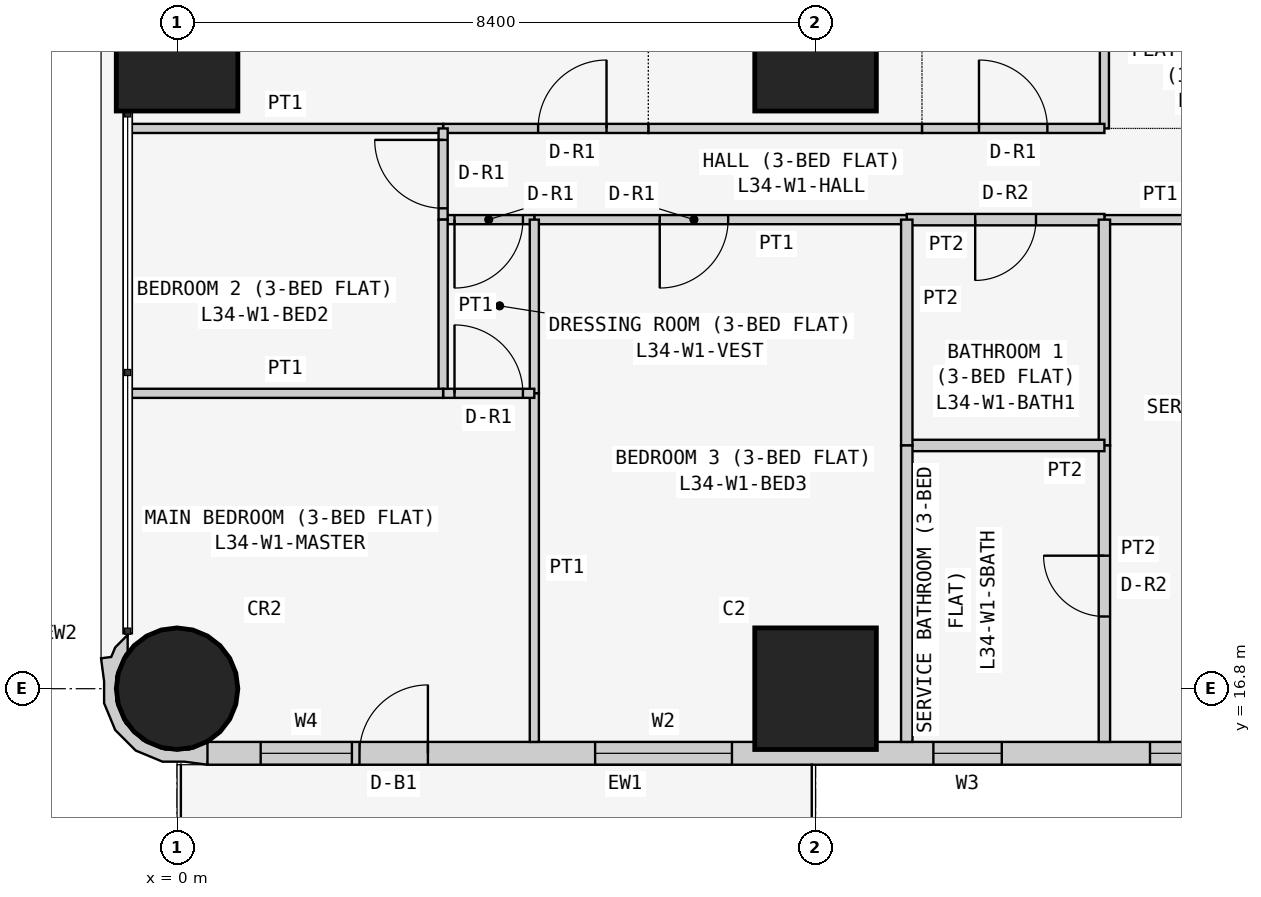
"""IFC4 building model, lengths in metres.
Left out: names, types, materials, properties, quantities, classifications, styles, units other than length and angle.
Written with IfcOpenShell. Run it as: python <this file> out.ifc"""

import sys

from ifc_helpers import new_model, si_unit, direction, frame, frame_2d, origin, origin_2d, place, context, subcontext, project, spatial, polyline, rectangle, circle, outline, extrude, element, fill, save


model = new_model("IFC4")
c1 = context("Model", 3, precision=1e-05, world=origin(), true_north=direction((0.0, 1.0)))
c2 = subcontext(c1, "Body", "Model", "MODEL_VIEW")
j1 = project(units=[si_unit("LENGTHUNIT", "METRE"), si_unit("PLANEANGLEUNIT", "RADIAN")], contexts=[c1])
p1 = place(None, origin())
s1 = spatial("IfcSite", under=j1, at=p1, CompositionType="ELEMENT")
p2 = place(p1, origin())
s2 = spatial("IfcBuilding", under=s1, at=p2, CompositionType="ELEMENT")
p3 = place(p2, frame((0.0, 0.0, 134.1)))
s3 = spatial("IfcBuildingStorey", under=s2, at=p3, CompositionType="ELEMENT", Elevation=134.1)
p4 = place(p3, frame((0.0, 16.8, 0.0), z_axis=(0.0, 0.0, 1.0), x_axis=(1.0, 0.0, 0.0)))
e1 = element("IfcColumn", 1, at=p4, inside=s3, PredefinedType="COLUMN", context=c2, shape_type="SweptSolid", body=[
    extrude(circle(Radius=0.8, at=origin_2d()), origin(), (0.0, 0.0, 1.0), 3.6),
])
for number, where, z_axis, x_axis in (
    (2, (0.0, 25.2, 0.0), (0.0, 0.0, 1.0), (1.0, 0.0, 0.0)),
    (3, (8.4, 16.8, 0.0), (0.0, 0.0, 1.0), (1.0, 0.0, 0.0)),
    (4, (8.4, 25.2, 0.0), (0.0, 0.0, 1.0), (1.0, 0.0, 0.0)),
):
    element("IfcColumn", number, at=place(p3, frame(where, z_axis=z_axis, x_axis=x_axis)), inside=s3, PredefinedType="COLUMN", context=c2, shape_type="SweptSolid", body=[
        extrude(rectangle(XDim=1.6, YDim=1.6, at=origin_2d()), origin(), (0.0, 0.0, 1.0), 3.6),
    ])
p5 = place(p3, frame((0.4, 15.95, 0.0), z_axis=(0.0, 0.0, 1.0), x_axis=(1.0, 0.0, 0.0)))
e5 = element("IfcWall", 5, at=p5, inside=s3, PredefinedType="SOLIDWALL", context=c2, shape_type="SweptSolid", body=[
    extrude(rectangle(XDim=15.7, YDim=0.3, at=frame_2d((7.85, 0.0))), origin(), (0.0, 0.0, 1.0), 3.45),
])
p6 = place(p5, frame((12.4, 0.0, 0.9)))
e6 = element("IfcOpeningElement", 6, at=p6, cuts=e5, PredefinedType="OPENING", context=c2, shape_type="SweptSolid", body=[
    extrude(rectangle(XDim=1.8, YDim=1.5, at=frame_2d((0.9, 0.75))), frame((0.0, 0.16, 0.0), z_axis=(0.0, -1.0, 0.0), x_axis=(1.0, 0.0, 0.0)), (0.0, 0.0, 1.0), 0.32),
])
p7 = place(p5, frame((9.55, 0.0, 1.5)))
e7 = element("IfcOpeningElement", 7, at=p7, cuts=e5, PredefinedType="OPENING", context=c2, shape_type="SweptSolid", body=[
    extrude(rectangle(XDim=0.9, YDim=0.7, at=frame_2d((0.45, 0.35))), frame((0.0, 0.16, 0.0), z_axis=(0.0, -1.0, 0.0), x_axis=(1.0, 0.0, 0.0)), (0.0, 0.0, 1.0), 0.32),
])
p8 = place(p5, frame((5.1, 0.0, 0.9)))
e8 = element("IfcOpeningElement", 8, at=p8, cuts=e5, PredefinedType="OPENING", context=c2, shape_type="SweptSolid", body=[
    extrude(rectangle(XDim=1.8, YDim=1.5, at=frame_2d((0.9, 0.75))), frame((0.0, 0.16, 0.0), z_axis=(0.0, -1.0, 0.0), x_axis=(1.0, 0.0, 0.0)), (0.0, 0.0, 1.0), 0.32),
])
p9 = place(p5, frame((2.0, 0.0, 0.0)))
e9 = element("IfcOpeningElement", 9, at=p9, cuts=e5, PredefinedType="OPENING", context=c2, shape_type="SweptSolid", body=[
    extrude(rectangle(XDim=0.9, YDim=2.4, at=frame_2d((0.45, 1.2))), frame((0.0, 0.16, 0.0), z_axis=(0.0, -1.0, 0.0), x_axis=(1.0, 0.0, 0.0)), (0.0, 0.0, 1.0), 0.32),
])
p10 = place(p5, frame((0.7, 0.0, 0.9)))
e10 = element("IfcOpeningElement", 10, at=p10, cuts=e5, PredefinedType="OPENING", context=c2, shape_type="SweptSolid", body=[
    extrude(rectangle(XDim=1.2, YDim=1.5, at=frame_2d((0.6, 0.75))), frame((0.0, 0.16, 0.0), z_axis=(0.0, -1.0, 0.0), x_axis=(1.0, 0.0, 0.0)), (0.0, 0.0, 1.0), 0.32),
])
p11 = place(p3, frame((-0.595, 17.448, 0.0), z_axis=(0.0, 0.0, 1.0), x_axis=(-0.93923434088, -0.343276641956, 0.0)))
e11 = element("IfcWall", 11, at=p11, inside=s3, PredefinedType="SOLIDWALL", context=c2, shape_type="SweptSolid", body=[
    extrude(outline(polyline([(-0.369, 1.89), (-0.509, 1.621), (-0.491, 1.614), (-0.479, 1.609), (-0.211, 1.62), (0.088, 1.511), (0.323, 1.295), (0.457, 1.006), (0.47, 0.688), (0.361, 0.389), (0.146, 0.154), (0.108, 0.137), (0.031, -0.075), (0.241, 0.023), (0.334, 0.124), (0.465, 0.094), (0.532, 0.393), (0.631, 0.663), (0.614, 1.045), (0.453, 1.391), (0.172, 1.649), (-0.098, 1.748), (-0.369, 1.89)])), origin(), (0.0, 0.0, 1.0), 3.45),
])
p12 = place(p3, frame((12.2, 29.4, 0.0), z_axis=(0.0, 0.0, 1.0), x_axis=(0.0, -1.0, 0.0)))
e12 = element("IfcWall", 12, at=p12, inside=s3, PredefinedType="PARTITIONING", context=c2, shape_type="SweptSolid", body=[
    extrude(rectangle(XDim=5.229, YDim=0.12, at=frame_2d((2.615, 0.0))), origin(), (0.0, 0.0, 1.0), 3.45),
])
p13 = place(p3, frame((9.8, 24.171, 0.0), z_axis=(0.0, 0.0, 1.0), x_axis=(1.0, 0.0, 0.0)))
e13 = element("IfcWall", 13, at=p13, inside=s3, PredefinedType="PARTITIONING", context=c2, shape_type="SweptSolid", body=[
    extrude(rectangle(XDim=2.4, YDim=0.12, at=frame_2d((1.2, 0.0))), origin(), (0.0, 0.0, 1.0), 3.45),
])
p14 = place(p13, frame((0.75, 0.0, 0.0)))
e14 = element("IfcOpeningElement", 14, at=p14, cuts=e13, PredefinedType="OPENING", context=c2, shape_type="SweptSolid", body=[
    extrude(rectangle(XDim=0.9, YDim=2.1, at=frame_2d((0.45, 1.05))), frame((0.0, 0.07, 0.0), z_axis=(0.0, -1.0, 0.0), x_axis=(1.0, 0.0, 0.0)), (0.0, 0.0, 1.0), 0.14),
])
p15 = place(p3, frame((6.2, 24.171, 0.0), z_axis=(0.0, 0.0, 1.0), x_axis=(1.0, 0.0, 0.0)))
e15 = element("IfcWall", 15, at=p15, inside=s3, PredefinedType="PARTITIONING", context=c2, shape_type="SweptSolid", body=[
    extrude(rectangle(XDim=3.6, YDim=0.12, at=frame_2d((1.8, 0.0))), origin(), (0.0, 0.0, 1.0), 3.45),
])
p16 = place(p3, frame((3.5, 24.171, 0.0), z_axis=(0.0, 0.0, 1.0), x_axis=(1.0, 0.0, 0.0)))
e16 = element("IfcWall", 16, at=p16, inside=s3, PredefinedType="PARTITIONING", context=c2, shape_type="SweptSolid", body=[
    extrude(rectangle(XDim=2.7, YDim=0.12, at=frame_2d((1.35, 0.0))), origin(), (0.0, 0.0, 1.0), 3.45),
])
p17 = place(p16, frame((1.25, 0.0, 0.0)))
e17 = element("IfcOpeningElement", 17, at=p17, cuts=e16, PredefinedType="OPENING", context=c2, shape_type="SweptSolid", body=[
    extrude(rectangle(XDim=0.9, YDim=2.1, at=frame_2d((0.45, 1.05))), frame((0.0, 0.07, 0.0), z_axis=(0.0, -1.0, 0.0), x_axis=(1.0, 0.0, 0.0)), (0.0, 0.0, 1.0), 0.14),
])
p18 = place(p3, frame((-0.65, 24.171, 0.0), z_axis=(0.0, 0.0, 1.0), x_axis=(1.0, 0.0, 0.0)))
e18 = element("IfcWall", 18, at=p18, inside=s3, PredefinedType="PARTITIONING", context=c2, shape_type="SweptSolid", body=[
    extrude(rectangle(XDim=4.15, YDim=0.12, at=frame_2d((2.075, 0.0))), origin(), (0.0, 0.0, 1.0), 3.45),
])
p19 = place(p3, frame((12.2, 22.971, 0.0), z_axis=(0.0, 0.0, 1.0), x_axis=(1.0, 0.0, 0.0)))
e19 = element("IfcWall", 19, at=p19, inside=s3, PredefinedType="PARTITIONING", context=c2, shape_type="SweptSolid", body=[
    extrude(rectangle(XDim=3.675, YDim=0.12, at=frame_2d((1.837, 0.0))), origin(), (0.0, 0.0, 1.0), 3.45),
])
p20 = place(p19, frame((1.35, 0.0, 0.0)))
e20 = element("IfcOpeningElement", 20, at=p20, cuts=e19, PredefinedType="OPENING", context=c2, shape_type="SweptSolid", body=[
    extrude(rectangle(XDim=0.9, YDim=2.1, at=frame_2d((0.45, 1.05))), frame((0.0, 0.07, 0.0), z_axis=(0.0, -1.0, 0.0), x_axis=(1.0, 0.0, 0.0)), (0.0, 0.0, 1.0), 0.14),
])
p21 = place(p3, frame((9.6, 22.971, 0.0), z_axis=(0.0, 0.0, 1.0), x_axis=(1.0, 0.0, 0.0)))
e21 = element("IfcWall", 21, at=p21, inside=s3, PredefinedType="PARTITIONING", context=c2, shape_type="SweptSolid", body=[
    extrude(rectangle(XDim=2.6, YDim=0.15, at=frame_2d((1.3, 0.0))), origin(), (0.0, 0.0, 1.0), 3.45),
])
p22 = place(p21, frame((0.9, 0.0, 0.0)))
e22 = element("IfcOpeningElement", 22, at=p22, cuts=e21, PredefinedType="OPENING", context=c2, shape_type="SweptSolid", body=[
    extrude(rectangle(XDim=0.8, YDim=2.1, at=frame_2d((0.4, 1.05))), frame((0.0, 0.085, 0.0), z_axis=(0.0, -1.0, 0.0), x_axis=(1.0, 0.0, 0.0)), (0.0, 0.0, 1.0), 0.17),
])
p23 = place(p3, frame((4.7, 22.971, 0.0), z_axis=(0.0, 0.0, 1.0), x_axis=(1.0, 0.0, 0.0)))
e23 = element("IfcWall", 23, at=p23, inside=s3, PredefinedType="PARTITIONING", context=c2, shape_type="SweptSolid", body=[
    extrude(rectangle(XDim=4.9, YDim=0.12, at=frame_2d((2.45, 0.0))), origin(), (0.0, 0.0, 1.0), 3.45),
])
p24 = place(p23, frame((1.65, 0.0, 0.0)))
e24 = element("IfcOpeningElement", 24, at=p24, cuts=e23, PredefinedType="OPENING", context=c2, shape_type="SweptSolid", body=[
    extrude(rectangle(XDim=0.9, YDim=2.1, at=frame_2d((0.45, 1.05))), frame((0.0, 0.07, 0.0), z_axis=(0.0, -1.0, 0.0), x_axis=(1.0, 0.0, 0.0)), (0.0, 0.0, 1.0), 0.14),
])
p25 = place(p3, frame((3.5, 22.971, 0.0), z_axis=(0.0, 0.0, 1.0), x_axis=(1.0, 0.0, 0.0)))
e25 = element("IfcWall", 25, at=p25, inside=s3, PredefinedType="PARTITIONING", context=c2, shape_type="SweptSolid", body=[
    extrude(rectangle(XDim=1.2, YDim=0.12, at=frame_2d((0.6, 0.0))), origin(), (0.0, 0.0, 1.0), 3.45),
])
p26 = place(p25, frame((0.15, 0.0, 0.0)))
e26 = element("IfcOpeningElement", 26, at=p26, cuts=e25, PredefinedType="OPENING", context=c2, shape_type="SweptSolid", body=[
    extrude(rectangle(XDim=0.9, YDim=2.1, at=frame_2d((0.45, 1.05))), frame((0.0, 0.07, 0.0), z_axis=(0.0, -1.0, 0.0), x_axis=(1.0, 0.0, 0.0)), (0.0, 0.0, 1.0), 0.14),
])
p27 = place(p3, frame((3.5, 24.171, 0.0), z_axis=(0.0, 0.0, 1.0), x_axis=(0.0, -1.0, 0.0)))
e27 = element("IfcWall", 27, at=p27, inside=s3, PredefinedType="PARTITIONING", context=c2, shape_type="SweptSolid", body=[
    extrude(rectangle(XDim=1.2, YDim=0.12, at=frame_2d((0.6, 0.0))), origin(), (0.0, 0.0, 1.0), 3.45),
])
p28 = place(p27, frame((0.151, 0.0, 0.0)))
e28 = element("IfcOpeningElement", 28, at=p28, cuts=e27, PredefinedType="OPENING", context=c2, shape_type="SweptSolid", body=[
    extrude(rectangle(XDim=0.9, YDim=2.1, at=frame_2d((0.45, 1.05))), frame((0.0, 0.07, 0.0), z_axis=(0.0, -1.0, 0.0), x_axis=(1.0, 0.0, 0.0)), (0.0, 0.0, 1.0), 0.14),
])
p29 = place(p3, frame((12.2, 22.971, 0.0), z_axis=(0.0, 0.0, 1.0), x_axis=(0.0, -1.0, 0.0)))
e29 = element("IfcWall", 29, at=p29, inside=s3, PredefinedType="PARTITIONING", context=c2, shape_type="SweptSolid", body=[
    extrude(rectangle(XDim=2.971, YDim=0.15, at=frame_2d((1.485, 0.0))), origin(), (0.0, 0.0, 1.0), 3.45),
])
p30 = place(p3, frame((12.2, 20.0, 0.0), z_axis=(0.0, 0.0, 1.0), x_axis=(0.0, -1.0, 0.0)))
e30 = element("IfcWall", 30, at=p30, inside=s3, PredefinedType="PARTITIONING", context=c2, shape_type="SweptSolid", body=[
    extrude(rectangle(XDim=3.9, YDim=0.15, at=frame_2d((1.95, 0.0))), origin(), (0.0, 0.0, 1.0), 3.45),
])
p31 = place(p30, frame((1.45, 0.0, 0.0)))
e31 = element("IfcOpeningElement", 31, at=p31, cuts=e30, PredefinedType="OPENING", context=c2, shape_type="SweptSolid", body=[
    extrude(rectangle(XDim=0.8, YDim=2.1, at=frame_2d((0.4, 1.05))), frame((0.0, 0.085, 0.0), z_axis=(0.0, -1.0, 0.0), x_axis=(1.0, 0.0, 0.0)), (0.0, 0.0, 1.0), 0.17),
])
p32 = place(p3, frame((9.6, 20.0, 0.0), z_axis=(0.0, 0.0, 1.0), x_axis=(1.0, 0.0, 0.0)))
e32 = element("IfcWall", 32, at=p32, inside=s3, PredefinedType="PARTITIONING", context=c2, shape_type="SweptSolid", body=[
    extrude(rectangle(XDim=2.6, YDim=0.15, at=frame_2d((1.3, 0.0))), origin(), (0.0, 0.0, 1.0), 3.45),
])
p33 = place(p3, frame((9.6, 22.971, 0.0), z_axis=(0.0, 0.0, 1.0), x_axis=(0.0, -1.0, 0.0)))
e33 = element("IfcWall", 33, at=p33, inside=s3, PredefinedType="PARTITIONING", context=c2, shape_type="SweptSolid", body=[
    extrude(rectangle(XDim=2.971, YDim=0.15, at=frame_2d((1.485, 0.0))), origin(), (0.0, 0.0, 1.0), 3.45),
])
p34 = place(p3, frame((9.6, 20.0, 0.0), z_axis=(0.0, 0.0, 1.0), x_axis=(0.0, -1.0, 0.0)))
e34 = element("IfcWall", 34, at=p34, inside=s3, PredefinedType="PARTITIONING", context=c2, shape_type="SweptSolid", body=[
    extrude(rectangle(XDim=3.9, YDim=0.15, at=frame_2d((1.95, 0.0))), origin(), (0.0, 0.0, 1.0), 3.45),
])
p35 = place(p3, frame((4.7, 22.971, 0.0), z_axis=(0.0, 0.0, 1.0), x_axis=(0.0, -1.0, 0.0)))
e35 = element("IfcWall", 35, at=p35, inside=s3, PredefinedType="PARTITIONING", context=c2, shape_type="SweptSolid", body=[
    extrude(rectangle(XDim=2.285, YDim=0.12, at=frame_2d((1.143, 0.0))), origin(), (0.0, 0.0, 1.0), 3.45),
])
p36 = place(p3, frame((4.7, 20.686, 0.0), z_axis=(0.0, 0.0, 1.0), x_axis=(0.0, -1.0, 0.0)))
e36 = element("IfcWall", 36, at=p36, inside=s3, PredefinedType="PARTITIONING", context=c2, shape_type="SweptSolid", body=[
    extrude(rectangle(XDim=4.586, YDim=0.12, at=frame_2d((2.293, 0.0))), origin(), (0.0, 0.0, 1.0), 3.45),
])
p37 = place(p3, frame((3.5, 22.971, 0.0), z_axis=(0.0, 0.0, 1.0), x_axis=(0.0, -1.0, 0.0)))
e37 = element("IfcWall", 37, at=p37, inside=s3, PredefinedType="PARTITIONING", context=c2, shape_type="SweptSolid", body=[
    extrude(rectangle(XDim=2.285, YDim=0.12, at=frame_2d((1.143, 0.0))), origin(), (0.0, 0.0, 1.0), 3.45),
])
p38 = place(p3, frame((3.5, 20.686, 0.0), z_axis=(0.0, 0.0, 1.0), x_axis=(1.0, 0.0, 0.0)))
e38 = element("IfcWall", 38, at=p38, inside=s3, PredefinedType="PARTITIONING", context=c2, shape_type="SweptSolid", body=[
    extrude(rectangle(XDim=1.2, YDim=0.12, at=frame_2d((0.6, 0.0))), origin(), (0.0, 0.0, 1.0), 3.45),
])
p39 = place(p38, frame((0.15, 0.0, 0.0)))
e39 = element("IfcOpeningElement", 39, at=p39, cuts=e38, PredefinedType="OPENING", context=c2, shape_type="SweptSolid", body=[
    extrude(rectangle(XDim=0.9, YDim=2.1, at=frame_2d((0.45, 1.05))), frame((0.0, 0.07, 0.0), z_axis=(0.0, -1.0, 0.0), x_axis=(1.0, 0.0, 0.0)), (0.0, 0.0, 1.0), 0.14),
])
p40 = place(p3, frame((-0.65, 20.686, 0.0), z_axis=(0.0, 0.0, 1.0), x_axis=(1.0, 0.0, 0.0)))
e40 = element("IfcWall", 40, at=p40, inside=s3, PredefinedType="PARTITIONING", context=c2, shape_type="SweptSolid", body=[
    extrude(rectangle(XDim=4.15, YDim=0.12, at=frame_2d((2.075, 0.0))), origin(), (0.0, 0.0, 1.0), 3.45),
])
p41 = place(p6, origin())
e41 = element("IfcWindow", 41, at=p41, inside=s3, PartitioningType="SINGLE_PANEL", PredefinedType="WINDOW", context=c2, shape_type="SweptSolid", body=[
    extrude(rectangle(XDim=1.8, YDim=1.5, at=frame_2d((0.9, 0.75))), frame((0.0, 0.03, 0.0), z_axis=(0.0, -1.0, 0.0), x_axis=(1.0, 0.0, 0.0)), (0.0, 0.0, 1.0), 0.06),
])
fill(e6, e41)
p42 = place(p7, origin())
e42 = element("IfcWindow", 42, at=p42, inside=s3, PartitioningType="SINGLE_PANEL", PredefinedType="WINDOW", context=c2, shape_type="SweptSolid", body=[
    extrude(rectangle(XDim=0.9, YDim=0.7, at=frame_2d((0.45, 0.35))), frame((0.0, 0.03, 0.0), z_axis=(0.0, -1.0, 0.0), x_axis=(1.0, 0.0, 0.0)), (0.0, 0.0, 1.0), 0.06),
])
fill(e7, e42)
p43 = place(p8, origin())
e43 = element("IfcWindow", 43, at=p43, inside=s3, PartitioningType="SINGLE_PANEL", PredefinedType="WINDOW", context=c2, shape_type="SweptSolid", body=[
    extrude(rectangle(XDim=1.8, YDim=1.5, at=frame_2d((0.9, 0.75))), frame((0.0, 0.03, 0.0), z_axis=(0.0, -1.0, 0.0), x_axis=(1.0, 0.0, 0.0)), (0.0, 0.0, 1.0), 0.06),
])
fill(e8, e43)
p44 = place(p9, origin())
e44 = element("IfcDoor", 44, at=p44, inside=s3, OperationType="SINGLE_SWING_RIGHT", PredefinedType="DOOR", context=c2, shape_type="SweptSolid", body=[
    extrude(rectangle(XDim=0.9, YDim=2.4, at=frame_2d((0.45, 1.2))), frame((0.0, 0.025, 0.0), z_axis=(0.0, -1.0, 0.0), x_axis=(1.0, 0.0, 0.0)), (0.0, 0.0, 1.0), 0.05),
])
fill(e9, e44)
p45 = place(p10, origin())
e45 = element("IfcWindow", 45, at=p45, inside=s3, PartitioningType="SINGLE_PANEL", PredefinedType="WINDOW", context=c2, shape_type="SweptSolid", body=[
    extrude(rectangle(XDim=1.2, YDim=1.5, at=frame_2d((0.6, 0.75))), frame((0.0, 0.03, 0.0), z_axis=(0.0, -1.0, 0.0), x_axis=(1.0, 0.0, 0.0)), (0.0, 0.0, 1.0), 0.06),
])
fill(e10, e45)
p46 = place(p14, origin())
e46 = element("IfcDoor", 46, at=p46, inside=s3, OperationType="SINGLE_SWING_LEFT", PredefinedType="DOOR", context=c2, shape_type="SweptSolid", body=[
    extrude(rectangle(XDim=0.9, YDim=2.1, at=frame_2d((0.45, 1.05))), frame((0.0, 0.025, 0.0), z_axis=(0.0, -1.0, 0.0), x_axis=(1.0, 0.0, 0.0)), (0.0, 0.0, 1.0), 0.05),
])
fill(e14, e46)
p47 = place(p17, origin())
e47 = element("IfcDoor", 47, at=p47, inside=s3, OperationType="SINGLE_SWING_RIGHT", PredefinedType="DOOR", context=c2, shape_type="SweptSolid", body=[
    extrude(rectangle(XDim=0.9, YDim=2.1, at=frame_2d((0.45, 1.05))), frame((0.0, 0.025, 0.0), z_axis=(0.0, -1.0, 0.0), x_axis=(1.0, 0.0, 0.0)), (0.0, 0.0, 1.0), 0.05),
])
fill(e17, e47)
p48 = place(p31, frame((0.8, 0.0, 0.0), z_axis=(0.0, 0.0, 1.0), x_axis=(-1.0, 0.0, 0.0)))
e48 = element("IfcDoor", 48, at=p48, inside=s3, OperationType="SINGLE_SWING_RIGHT", PredefinedType="DOOR", context=c2, shape_type="SweptSolid", body=[
    extrude(rectangle(XDim=0.8, YDim=2.1, at=frame_2d((0.4, 1.05))), frame((0.0, 0.025, 0.0), z_axis=(0.0, -1.0, 0.0), x_axis=(1.0, 0.0, 0.0)), (0.0, 0.0, 1.0), 0.05),
])
fill(e31, e48)
p49 = place(p22, frame((0.8, 0.0, 0.0), z_axis=(0.0, 0.0, 1.0), x_axis=(-1.0, 0.0, 0.0)))
e49 = element("IfcDoor", 49, at=p49, inside=s3, OperationType="SINGLE_SWING_RIGHT", PredefinedType="DOOR", context=c2, shape_type="SweptSolid", body=[
    extrude(rectangle(XDim=0.8, YDim=2.1, at=frame_2d((0.4, 1.05))), frame((0.0, 0.025, 0.0), z_axis=(0.0, -1.0, 0.0), x_axis=(1.0, 0.0, 0.0)), (0.0, 0.0, 1.0), 0.05),
])
fill(e22, e49)
p50 = place(p24, frame((0.9, 0.0, 0.0), z_axis=(0.0, 0.0, 1.0), x_axis=(-1.0, 0.0, 0.0)))
e50 = element("IfcDoor", 50, at=p50, inside=s3, OperationType="SINGLE_SWING_RIGHT", PredefinedType="DOOR", context=c2, shape_type="SweptSolid", body=[
    extrude(rectangle(XDim=0.9, YDim=2.1, at=frame_2d((0.45, 1.05))), frame((0.0, 0.025, 0.0), z_axis=(0.0, -1.0, 0.0), x_axis=(1.0, 0.0, 0.0)), (0.0, 0.0, 1.0), 0.05),
])
fill(e24, e50)
p51 = place(p26, frame((0.9, 0.0, 0.0), z_axis=(0.0, 0.0, 1.0), x_axis=(-1.0, 0.0, 0.0)))
e51 = element("IfcDoor", 51, at=p51, inside=s3, OperationType="SINGLE_SWING_RIGHT", PredefinedType="DOOR", context=c2, shape_type="SweptSolid", body=[
    extrude(rectangle(XDim=0.9, YDim=2.1, at=frame_2d((0.45, 1.05))), frame((0.0, 0.025, 0.0), z_axis=(0.0, -1.0, 0.0), x_axis=(1.0, 0.0, 0.0)), (0.0, 0.0, 1.0), 0.05),
])
fill(e26, e51)
p52 = place(p39, origin())
e52 = element("IfcDoor", 52, at=p52, inside=s3, OperationType="SINGLE_SWING_LEFT", PredefinedType="DOOR", context=c2, shape_type="SweptSolid", body=[
    extrude(rectangle(XDim=0.9, YDim=2.1, at=frame_2d((0.45, 1.05))), frame((0.0, 0.025, 0.0), z_axis=(0.0, -1.0, 0.0), x_axis=(1.0, 0.0, 0.0)), (0.0, 0.0, 1.0), 0.05),
])
fill(e39, e52)
p53 = place(p28, frame((0.9, 0.0, 0.0), z_axis=(0.0, 0.0, 1.0), x_axis=(-1.0, 0.0, 0.0)))
e53 = element("IfcDoor", 53, at=p53, inside=s3, OperationType="SINGLE_SWING_RIGHT", PredefinedType="DOOR", context=c2, shape_type="SweptSolid", body=[
    extrude(rectangle(XDim=0.9, YDim=2.1, at=frame_2d((0.45, 1.05))), frame((0.0, 0.025, 0.0), z_axis=(0.0, -1.0, 0.0), x_axis=(1.0, 0.0, 0.0)), (0.0, 0.0, 1.0), 0.05),
])
fill(e28, e53)
save(model, sys.argv[1])
